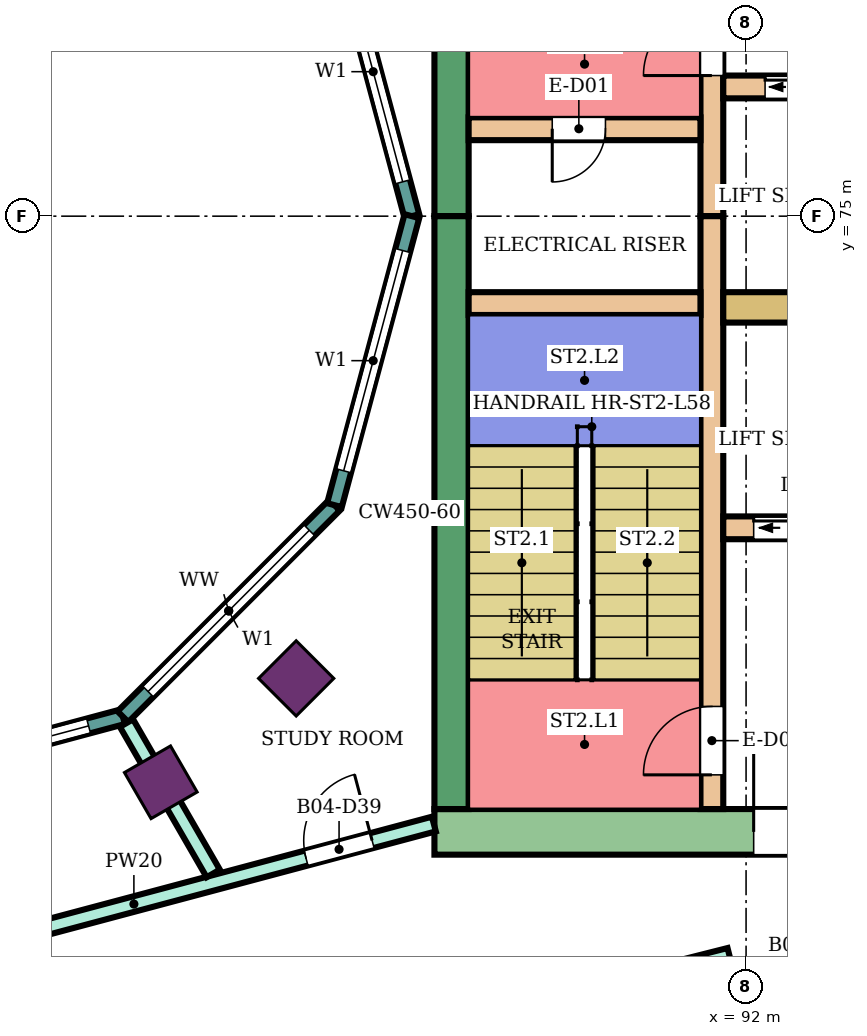
"""IFC4 building model, lengths in metres.
Left out: names, types, materials, properties, quantities, classifications, styles, units other than length and angle.
Written with IfcOpenShell. Run it as: python <this file> out.ifc"""

import sys

from ifc_helpers import new_model, si_unit, direction, frame, frame_2d, origin, origin_2d, place, context, subcontext, project, spatial, rectangle, extrude, element, fill, save


model = new_model("IFC4")
c1 = context("Model", 3, precision=1e-05, world=origin(), true_north=direction((0.0, 1.0)))
c2 = subcontext(c1, "Body", "Model", "MODEL_VIEW")
j1 = project(units=[si_unit("LENGTHUNIT", "METRE"), si_unit("PLANEANGLEUNIT", "RADIAN")], contexts=[c1])
p1 = place(None, origin())
s1 = spatial("IfcSite", under=j1, at=p1, CompositionType="ELEMENT")
p2 = place(p1, origin())
s2 = spatial("IfcBuilding", under=s1, at=p2, CompositionType="ELEMENT")
p3 = place(p2, frame((0.0, 0.0, 254.1)))
s3 = spatial("IfcBuildingStorey", under=s2, at=p3, CompositionType="ELEMENT", Elevation=254.1)
for number, where, z_axis, x_axis in (
    (1, (84.3, 67.552, 0.0), (0.0, 0.0, 1.0), (0.5, -0.866, 0.0)),
    (2, (86.081, 68.919, 0.0), (0.0, 0.0, 1.0), (0.707, -0.707, 0.0)),
):
    element("IfcColumn", number, at=place(p3, frame(where, z_axis=z_axis, x_axis=x_axis)), inside=s3, PredefinedType="COLUMN", context=c2, shape_type="SweptSolid", body=[
        extrude(rectangle(XDim=0.7, YDim=0.7, at=origin_2d()), origin(), (0.0, 0.0, 1.0), 4.2),
    ])
p4 = place(p3, frame((87.9, 66.9, 0.0), z_axis=(0.0, 0.0, 1.0), x_axis=(1.0, 0.0, 0.0)))
e3 = element("IfcWall", 3, at=p4, inside=s3, PredefinedType="SHEAR", context=c2, shape_type="SweptSolid", body=[
    extrude(rectangle(XDim=14.9, YDim=0.6, at=frame_2d((7.45, 0.0))), origin(), (0.0, 0.0, 1.0), 3.88),
])
p5 = place(p4, frame((4.2, 0.0, 0.0)))
e4 = element("IfcOpeningElement", 4, at=p5, cuts=e3, PredefinedType="OPENING", context=c2, shape_type="SweptSolid", body=[
    extrude(rectangle(XDim=2.4, YDim=2.4, at=frame_2d((1.2, 1.2))), frame((0.0, 0.31, 0.0), z_axis=(0.0, -1.0, 0.0), x_axis=(1.0, 0.0, 0.0)), (0.0, 0.0, 1.0), 0.62),
])
for number, where, z_axis, x_axis in (
    (5, (88.125, 75.0, 0.0), (0.0, 0.0, 1.0), (0.0, 1.0, 0.0)),
    (6, (88.125, 67.2, 0.0), (0.0, 0.0, 1.0), (0.0, 1.0, 0.0)),
):
    element("IfcWall", number, at=place(p3, frame(where, z_axis=z_axis, x_axis=x_axis)), inside=s3, PredefinedType="SHEAR", context=c2, shape_type="SweptSolid", body=[
        extrude(rectangle(XDim=7.8, YDim=0.45, at=frame_2d((3.9, 0.0))), origin(), (0.0, 0.0, 1.0), 3.88),
    ])
p6 = place(p3, frame((91.55, 75.0, 0.0), z_axis=(0.0, 0.0, 1.0), x_axis=(0.0, 1.0, 0.0)))
e7 = element("IfcWall", 7, at=p6, inside=s3, PredefinedType="SHEAR", context=c2, shape_type="SweptSolid", body=[
    extrude(rectangle(XDim=7.8, YDim=0.3, at=frame_2d((3.9, 0.0))), origin(), (0.0, 0.0, 1.0), 3.88),
])
p7 = place(p6, frame((1.85, 0.0, 0.0)))
e8 = element("IfcOpeningElement", 8, at=p7, cuts=e7, PredefinedType="OPENING", context=c2, shape_type="SweptSolid", body=[
    extrude(rectangle(XDim=0.9, YDim=2.1, at=frame_2d((0.45, 1.05))), frame((0.0, 0.16, 0.0), z_axis=(0.0, -1.0, 0.0), x_axis=(1.0, 0.0, 0.0)), (0.0, 0.0, 1.0), 0.32),
])
p8 = place(p3, frame((91.55, 67.2, 0.0), z_axis=(0.0, 0.0, 1.0), x_axis=(0.0, 1.0, 0.0)))
e9 = element("IfcWall", 9, at=p8, inside=s3, PredefinedType="SHEAR", context=c2, shape_type="SweptSolid", body=[
    extrude(rectangle(XDim=7.8, YDim=0.3, at=frame_2d((3.9, 0.0))), origin(), (0.0, 0.0, 1.0), 3.88),
])
p9 = place(p8, frame((0.45, 0.0, 0.0)))
e10 = element("IfcOpeningElement", 10, at=p9, cuts=e9, PredefinedType="OPENING", context=c2, shape_type="SweptSolid", body=[
    extrude(rectangle(XDim=0.9, YDim=2.1, at=frame_2d((0.45, 1.05))), frame((0.0, 0.16, 0.0), z_axis=(0.0, -1.0, 0.0), x_axis=(1.0, 0.0, 0.0)), (0.0, 0.0, 1.0), 0.32),
])
p10 = place(p3, frame((88.35, 76.15, 0.0), z_axis=(0.0, 0.0, 1.0), x_axis=(1.0, 0.0, 0.0)))
e11 = element("IfcWall", 11, at=p10, inside=s3, PredefinedType="SHEAR", context=c2, shape_type="SweptSolid", body=[
    extrude(rectangle(XDim=3.05, YDim=0.3, at=frame_2d((1.525, 0.0))), origin(), (0.0, 0.0, 1.0), 3.88),
])
p11 = place(p10, frame((1.1, 0.0, 0.0)))
e12 = element("IfcOpeningElement", 12, at=p11, cuts=e11, PredefinedType="OPENING", context=c2, shape_type="SweptSolid", body=[
    extrude(rectangle(XDim=0.7, YDim=2.0, at=frame_2d((0.35, 1.0))), frame((0.0, 0.16, 0.0), z_axis=(0.0, -1.0, 0.0), x_axis=(1.0, 0.0, 0.0)), (0.0, 0.0, 1.0), 0.32),
])
p12 = place(p3, frame((88.35, 73.85, 0.0), z_axis=(0.0, 0.0, 1.0), x_axis=(1.0, 0.0, 0.0)))
e13 = element("IfcWall", 13, at=p12, inside=s3, PredefinedType="SHEAR", context=c2, shape_type="SweptSolid", body=[
    extrude(rectangle(XDim=3.05, YDim=0.3, at=frame_2d((1.525, 0.0))), origin(), (0.0, 0.0, 1.0), 3.88),
])
p13 = place(p3, frame((91.7, 76.7, 0.0), z_axis=(0.0, 0.0, 1.0), x_axis=(1.0, 0.0, 0.0)))
e14 = element("IfcWall", 14, at=p13, inside=s3, PredefinedType="SHEAR", context=c2, shape_type="SweptSolid", body=[
    extrude(rectangle(XDim=11.1, YDim=0.3, at=frame_2d((5.55, 0.0))), origin(), (0.0, 0.0, 1.0), 3.88),
])
p14 = place(p13, frame((0.55, 0.0, 0.0)))
e15 = element("IfcOpeningElement", 15, at=p14, cuts=e14, PredefinedType="OPENING", context=c2, shape_type="SweptSolid", body=[
    extrude(rectangle(XDim=1.1, YDim=2.1, at=frame_2d((0.55, 1.05))), frame((0.0, 0.16, 0.0), z_axis=(0.0, -1.0, 0.0), x_axis=(1.0, 0.0, 0.0)), (0.0, 0.0, 1.0), 0.32),
])
p15 = place(p13, frame((3.0, 0.0, 0.0)))
e16 = element("IfcOpeningElement", 16, at=p15, cuts=e14, PredefinedType="OPENING", context=c2, shape_type="SweptSolid", body=[
    extrude(rectangle(XDim=1.2, YDim=2.1, at=frame_2d((0.6, 1.05))), frame((0.0, 0.16, 0.0), z_axis=(0.0, -1.0, 0.0), x_axis=(1.0, 0.0, 0.0)), (0.0, 0.0, 1.0), 0.32),
])
p16 = place(p13, frame((5.5, 0.0, 0.0)))
e17 = element("IfcOpeningElement", 17, at=p16, cuts=e14, PredefinedType="OPENING", context=c2, shape_type="SweptSolid", body=[
    extrude(rectangle(XDim=1.2, YDim=2.1, at=frame_2d((0.6, 1.05))), frame((0.0, 0.16, 0.0), z_axis=(0.0, -1.0, 0.0), x_axis=(1.0, 0.0, 0.0)), (0.0, 0.0, 1.0), 0.32),
])
p17 = place(p13, frame((7.77, 0.0, 0.0)))
e18 = element("IfcOpeningElement", 18, at=p17, cuts=e14, PredefinedType="OPENING", context=c2, shape_type="SweptSolid", body=[
    extrude(rectangle(XDim=0.9, YDim=2.1, at=frame_2d((0.45, 1.05))), frame((0.0, 0.16, 0.0), z_axis=(0.0, -1.0, 0.0), x_axis=(1.0, 0.0, 0.0)), (0.0, 0.0, 1.0), 0.32),
])
p18 = place(p13, frame((9.57, 0.0, 0.0)))
e19 = element("IfcOpeningElement", 19, at=p18, cuts=e14, PredefinedType="OPENING", context=c2, shape_type="SweptSolid", body=[
    extrude(rectangle(XDim=0.9, YDim=2.1, at=frame_2d((0.45, 1.05))), frame((0.0, 0.16, 0.0), z_axis=(0.0, -1.0, 0.0), x_axis=(1.0, 0.0, 0.0)), (0.0, 0.0, 1.0), 0.32),
])
p19 = place(p3, frame((91.7, 73.8, 0.0), z_axis=(0.0, 0.0, 1.0), x_axis=(1.0, 0.0, 0.0)))
e20 = element("IfcWall", 20, at=p19, inside=s3, PredefinedType="SHEAR", context=c2, shape_type="SweptSolid", body=[
    extrude(rectangle(XDim=11.1, YDim=0.4, at=frame_2d((5.55, 0.0))), origin(), (0.0, 0.0, 1.0), 3.88),
])
p20 = place(p3, frame((91.7, 70.9, 0.0), z_axis=(0.0, 0.0, 1.0), x_axis=(1.0, 0.0, 0.0)))
e21 = element("IfcWall", 21, at=p20, inside=s3, PredefinedType="SHEAR", context=c2, shape_type="SweptSolid", body=[
    extrude(rectangle(XDim=11.1, YDim=0.3, at=frame_2d((5.55, 0.0))), origin(), (0.0, 0.0, 1.0), 3.88),
])
p21 = place(p20, frame((0.4, 0.0, 0.0)))
e22 = element("IfcOpeningElement", 22, at=p21, cuts=e21, PredefinedType="OPENING", context=c2, shape_type="SweptSolid", body=[
    extrude(rectangle(XDim=1.4, YDim=2.1, at=frame_2d((0.7, 1.05))), frame((0.0, 0.16, 0.0), z_axis=(0.0, -1.0, 0.0), x_axis=(1.0, 0.0, 0.0)), (0.0, 0.0, 1.0), 0.32),
])
p22 = place(p20, frame((3.0, 0.0, 0.0)))
e23 = element("IfcOpeningElement", 23, at=p22, cuts=e21, PredefinedType="OPENING", context=c2, shape_type="SweptSolid", body=[
    extrude(rectangle(XDim=1.2, YDim=2.1, at=frame_2d((0.6, 1.05))), frame((0.0, 0.16, 0.0), z_axis=(0.0, -1.0, 0.0), x_axis=(1.0, 0.0, 0.0)), (0.0, 0.0, 1.0), 0.32),
])
p23 = place(p20, frame((5.77, 0.0, 0.0)))
e24 = element("IfcOpeningElement", 24, at=p23, cuts=e21, PredefinedType="OPENING", context=c2, shape_type="SweptSolid", body=[
    extrude(rectangle(XDim=0.9, YDim=2.1, at=frame_2d((0.45, 1.05))), frame((0.0, 0.16, 0.0), z_axis=(0.0, -1.0, 0.0), x_axis=(1.0, 0.0, 0.0)), (0.0, 0.0, 1.0), 0.32),
])
p24 = place(p20, frame((8.82, 0.0, 0.0)))
e25 = element("IfcOpeningElement", 25, at=p24, cuts=e21, PredefinedType="OPENING", context=c2, shape_type="SweptSolid", body=[
    extrude(rectangle(XDim=0.9, YDim=2.1, at=frame_2d((0.45, 1.05))), frame((0.0, 0.16, 0.0), z_axis=(0.0, -1.0, 0.0), x_axis=(1.0, 0.0, 0.0)), (0.0, 0.0, 1.0), 0.32),
])
p25 = place(p3, frame((87.604, 75.0, 0.0), z_axis=(0.0, 0.0, 1.0), x_axis=(-0.258789828301, 0.965933654434, 0.0)))
e26 = element("IfcWall", 26, at=p25, inside=s3, PredefinedType="NOTDEFINED", context=c2, shape_type="SweptSolid", body=[
    extrude(rectangle(XDim=3.936, YDim=0.2, at=frame_2d((1.968, 0.0))), origin(), (0.0, 0.0, 1.0), 4.2),
])
p26 = place(p25, frame((0.468, 0.0, 0.9)))
e27 = element("IfcOpeningElement", 27, at=p26, cuts=e26, PredefinedType="OPENING", context=c2, shape_type="SweptSolid", body=[
    extrude(rectangle(XDim=3.0, YDim=2.3, at=frame_2d((1.5, 1.15))), frame((0.0, 0.11, 0.0), z_axis=(0.0, -1.0, 0.0), x_axis=(1.0, 0.0, 0.0)), (0.0, 0.0, 1.0), 0.22),
])
p27 = place(p3, frame((80.0, 67.396, 0.0), z_axis=(0.0, 0.0, 1.0), x_axis=(0.965933654434, 0.258789828301, 0.0)))
e28 = element("IfcWall", 28, at=p27, inside=s3, PredefinedType="NOTDEFINED", context=c2, shape_type="SweptSolid", body=[
    extrude(rectangle(XDim=3.936, YDim=0.2, at=frame_2d((1.968, 0.0))), origin(), (0.0, 0.0, 1.0), 4.2),
])
p28 = place(p27, frame((0.468, 0.0, 0.9)))
e29 = element("IfcOpeningElement", 29, at=p28, cuts=e28, PredefinedType="OPENING", context=c2, shape_type="SweptSolid", body=[
    extrude(rectangle(XDim=3.0, YDim=2.3, at=frame_2d((1.5, 1.15))), frame((0.0, 0.11, 0.0), z_axis=(0.0, -1.0, 0.0), x_axis=(1.0, 0.0, 0.0)), (0.0, 0.0, 1.0), 0.22),
])
p29 = place(p3, frame((83.802, 68.415, 0.0), z_axis=(0.0, 0.0, 1.0), x_axis=(0.707106781187, 0.707106781187, 0.0)))
e30 = element("IfcWall", 30, at=p29, inside=s3, PredefinedType="NOTDEFINED", context=c2, shape_type="SweptSolid", body=[
    extrude(rectangle(XDim=3.936, YDim=0.2, at=frame_2d((1.968, 0.0))), origin(), (0.0, 0.0, 1.0), 4.2),
])
p30 = place(p29, frame((0.468, 0.0, 0.9)))
e31 = element("IfcOpeningElement", 31, at=p30, cuts=e30, PredefinedType="OPENING", context=c2, shape_type="SweptSolid", body=[
    extrude(rectangle(XDim=3.0, YDim=2.3, at=frame_2d((1.5, 1.15))), frame((0.0, 0.11, 0.0), z_axis=(0.0, -1.0, 0.0), x_axis=(1.0, 0.0, 0.0)), (0.0, 0.0, 1.0), 0.22),
])
p31 = place(p3, frame((86.585, 71.198, 0.0), z_axis=(0.0, 0.0, 1.0), x_axis=(0.258789828301, 0.965933654434, 0.0)))
e32 = element("IfcWall", 32, at=p31, inside=s3, PredefinedType="NOTDEFINED", context=c2, shape_type="SweptSolid", body=[
    extrude(rectangle(XDim=3.936, YDim=0.2, at=frame_2d((1.968, 0.0))), origin(), (0.0, 0.0, 1.0), 4.2),
])
p32 = place(p31, frame((0.468, 0.0, 0.9)))
e33 = element("IfcOpeningElement", 33, at=p32, cuts=e32, PredefinedType="OPENING", context=c2, shape_type="SweptSolid", body=[
    extrude(rectangle(XDim=3.0, YDim=2.3, at=frame_2d((1.5, 1.15))), frame((0.0, 0.11, 0.0), z_axis=(0.0, -1.0, 0.0), x_axis=(1.0, 0.0, 0.0)), (0.0, 0.0, 1.0), 0.22),
])
p33 = place(p3, frame((80.0, 64.898, 0.0), z_axis=(0.0, 0.0, 1.0), x_axis=(0.966237419782, 0.257653349704, 0.0)))
e34 = element("IfcWall", 34, at=p33, inside=s3, PredefinedType="PARTITIONING", context=c2, shape_type="SweptSolid", body=[
    extrude(rectangle(XDim=8.169, YDim=0.2, at=frame_2d((4.084, 0.0))), origin(), (0.0, 0.0, 1.0), 3.75),
])
p34 = place(p33, frame((6.428, 0.0, 0.0)))
e35 = element("IfcOpeningElement", 35, at=p34, cuts=e34, PredefinedType="OPENING", context=c2, shape_type="SweptSolid", body=[
    extrude(rectangle(XDim=0.9, YDim=2.1, at=frame_2d((0.45, 1.05))), frame((0.0, 0.11, 0.0), z_axis=(0.0, -1.0, 0.0), x_axis=(1.0, 0.0, 0.0)), (0.0, 0.0, 1.0), 0.22),
])
p35 = place(p3, frame((83.848, 68.331, 0.0), z_axis=(0.0, 0.0, 1.0), x_axis=(0.499851978358, -0.866110847255, 0.0)))
e36 = element("IfcWall", 36, at=p35, inside=s3, PredefinedType="PARTITIONING", context=c2, shape_type="SweptSolid", body=[
    extrude(rectangle(XDim=2.284, YDim=0.2, at=frame_2d((1.142, 0.0))), origin(), (0.0, 0.0, 1.0), 3.75),
])
p36 = place(p3, frame((86.053, 63.826, 0.0), z_axis=(0.0, 0.0, 1.0), x_axis=(0.969490004987, 0.245130843083, 0.0)))
e37 = element("IfcWall", 37, at=p36, inside=s3, PredefinedType="PARTITIONING", context=c2, shape_type="SweptSolid", body=[
    extrude(rectangle(XDim=5.908, YDim=0.2, at=frame_2d((2.954, 0.0))), origin(), (0.0, 0.0, 1.0), 3.75),
])
p37 = place(p26, origin())
e38 = element("IfcWindow", 38, at=p37, inside=s3, PartitioningType="SINGLE_PANEL", PredefinedType="WINDOW", context=c2, shape_type="SweptSolid", body=[
    extrude(rectangle(XDim=3.0, YDim=2.3, at=frame_2d((1.5, 1.15))), frame((0.0, 0.03, 0.0), z_axis=(0.0, -1.0, 0.0), x_axis=(1.0, 0.0, 0.0)), (0.0, 0.0, 1.0), 0.06),
])
fill(e27, e38)
p38 = place(p28, origin())
e39 = element("IfcWindow", 39, at=p38, inside=s3, PartitioningType="SINGLE_PANEL", PredefinedType="WINDOW", context=c2, shape_type="SweptSolid", body=[
    extrude(rectangle(XDim=3.0, YDim=2.3, at=frame_2d((1.5, 1.15))), frame((0.0, 0.03, 0.0), z_axis=(0.0, -1.0, 0.0), x_axis=(1.0, 0.0, 0.0)), (0.0, 0.0, 1.0), 0.06),
])
fill(e29, e39)
p39 = place(p30, origin())
e40 = element("IfcWindow", 40, at=p39, inside=s3, PartitioningType="SINGLE_PANEL", PredefinedType="WINDOW", context=c2, shape_type="SweptSolid", body=[
    extrude(rectangle(XDim=3.0, YDim=2.3, at=frame_2d((1.5, 1.15))), frame((0.0, 0.03, 0.0), z_axis=(0.0, -1.0, 0.0), x_axis=(1.0, 0.0, 0.0)), (0.0, 0.0, 1.0), 0.06),
])
fill(e31, e40)
p40 = place(p32, origin())
e41 = element("IfcWindow", 41, at=p40, inside=s3, PartitioningType="SINGLE_PANEL", PredefinedType="WINDOW", context=c2, shape_type="SweptSolid", body=[
    extrude(rectangle(XDim=3.0, YDim=2.3, at=frame_2d((1.5, 1.15))), frame((0.0, 0.03, 0.0), z_axis=(0.0, -1.0, 0.0), x_axis=(1.0, 0.0, 0.0)), (0.0, 0.0, 1.0), 0.06),
])
fill(e33, e41)
p41 = place(p34, origin())
e42 = element("IfcDoor", 42, at=p41, inside=s3, OperationType="SINGLE_SWING_RIGHT", PredefinedType="DOOR", context=c2, shape_type="SweptSolid", body=[
    extrude(rectangle(XDim=0.9, YDim=2.1, at=frame_2d((0.45, 1.05))), frame((0.0, 0.025, 0.0), z_axis=(0.0, -1.0, 0.0), x_axis=(1.0, 0.0, 0.0)), (0.0, 0.0, 1.0), 0.05),
])
fill(e35, e42)
p42 = place(p11, frame((0.7, 0.0, 0.0), z_axis=(0.0, 0.0, 1.0), x_axis=(-1.0, 0.0, 0.0)))
e43 = element("IfcDoor", 43, at=p42, inside=s3, OperationType="SINGLE_SWING_RIGHT", PredefinedType="DOOR", context=c2, shape_type="SweptSolid", body=[
    extrude(rectangle(XDim=0.7, YDim=2.0, at=frame_2d((0.35, 1.0))), frame((0.0, 0.025, 0.0), z_axis=(0.0, -1.0, 0.0), x_axis=(1.0, 0.0, 0.0)), (0.0, 0.0, 1.0), 0.05),
])
fill(e12, e43)
p43 = place(p7, origin())
e44 = element("IfcDoor", 44, at=p43, inside=s3, OperationType="SINGLE_SWING_LEFT", PredefinedType="DOOR", context=c2, shape_type="SweptSolid", body=[
    extrude(rectangle(XDim=0.9, YDim=2.1, at=frame_2d((0.45, 1.05))), frame((0.0, 0.025, 0.0), z_axis=(0.0, -1.0, 0.0), x_axis=(1.0, 0.0, 0.0)), (0.0, 0.0, 1.0), 0.05),
])
fill(e8, e44)
p44 = place(p9, origin())
e45 = element("IfcDoor", 45, at=p44, inside=s3, OperationType="SINGLE_SWING_LEFT", PredefinedType="DOOR", context=c2, shape_type="SweptSolid", body=[
    extrude(rectangle(XDim=0.9, YDim=2.1, at=frame_2d((0.45, 1.05))), frame((0.0, 0.025, 0.0), z_axis=(0.0, -1.0, 0.0), x_axis=(1.0, 0.0, 0.0)), (0.0, 0.0, 1.0), 0.05),
])
fill(e10, e45)
p45 = place(p14, origin())
e46 = element("IfcDoor", 46, at=p45, inside=s3, OperationType="DOUBLE_DOOR_SLIDING", PredefinedType="DOOR", context=c2, shape_type="SweptSolid", body=[
    extrude(rectangle(XDim=1.1, YDim=2.1, at=frame_2d((0.55, 1.05))), frame((0.0, 0.025, 0.0), z_axis=(0.0, -1.0, 0.0), x_axis=(1.0, 0.0, 0.0)), (0.0, 0.0, 1.0), 0.05),
])
fill(e15, e46)
p46 = place(p21, origin())
e47 = element("IfcDoor", 47, at=p46, inside=s3, OperationType="DOUBLE_DOOR_SLIDING", PredefinedType="DOOR", context=c2, shape_type="SweptSolid", body=[
    extrude(rectangle(XDim=1.4, YDim=2.1, at=frame_2d((0.7, 1.05))), frame((0.0, 0.025, 0.0), z_axis=(0.0, -1.0, 0.0), x_axis=(1.0, 0.0, 0.0)), (0.0, 0.0, 1.0), 0.05),
])
fill(e22, e47)
p47 = place(p5, origin())
e48 = element("IfcDoor", 48, at=p47, inside=s3, OperationType="DOUBLE_DOOR_SINGLE_SWING", PredefinedType="DOOR", context=c2, shape_type="SweptSolid", body=[
    extrude(rectangle(XDim=2.4, YDim=2.4, at=frame_2d((1.2, 1.2))), frame((0.0, 0.025, 0.0), z_axis=(0.0, -1.0, 0.0), x_axis=(1.0, 0.0, 0.0)), (0.0, 0.0, 1.0), 0.05),
])
fill(e4, e48)
save(model, sys.argv[1])
